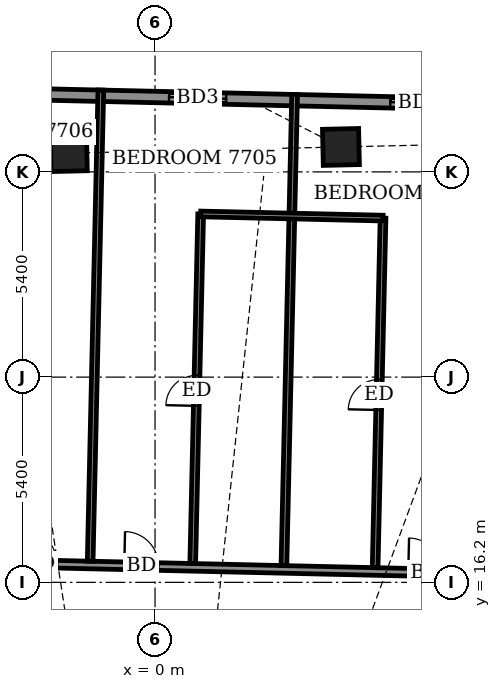
"""IFC4 building model, lengths in metres.
Left out: names, types, materials, properties, quantities, classifications, styles, units other than length and angle.
Written with IfcOpenShell. Run it as: python <this file> out.ifc"""

import sys

from ifc_helpers import new_model, si_unit, direction, frame, frame_2d, origin, origin_2d, place, context, subcontext, project, spatial, rectangle, extrude, element, fill, save


model = new_model("IFC4")
c1 = context("Model", 3, precision=1e-05, world=origin(), true_north=direction((0.0, 1.0)))
c2 = subcontext(c1, "Body", "Model", "MODEL_VIEW")
j1 = project(units=[si_unit("LENGTHUNIT", "METRE"), si_unit("PLANEANGLEUNIT", "RADIAN")], contexts=[c1])
p1 = place(None, origin())
s1 = spatial("IfcSite", under=j1, at=p1, CompositionType="ELEMENT")
p2 = place(p1, origin())
s2 = spatial("IfcBuilding", under=s1, at=p2, CompositionType="ELEMENT")
p3 = place(p2, frame((0.0, 0.0, 301.5)))
s3 = spatial("IfcBuildingStorey", under=s2, at=p3, CompositionType="ELEMENT", Elevation=301.5)
for number, where, z_axis, x_axis in (
    (1, (4.892, 27.656, -0.55), (0.0, 0.0, 1.0), (-1.0, -0.023, 0.0)),
    (2, (-2.268, 27.494, -0.55), (0.0, 0.0, 1.0), (-1.0, -0.023, 0.0)),
):
    element("IfcColumn", number, at=place(p3, frame(where, z_axis=z_axis, x_axis=x_axis)), inside=s3, PredefinedType="COLUMN", context=c2, shape_type="SweptSolid", body=[
        extrude(rectangle(XDim=0.95, YDim=0.95, at=origin_2d()), origin(), (0.0, 0.0, 1.0), 4.6),
    ])
p4 = place(p3, frame((25.264, 28.397, 0.0), z_axis=(0.0, 0.0, 1.0), x_axis=(-0.999742391375, 0.022696935658, 0.0)))
e3 = element("IfcWall", 3, at=p4, inside=s3, PredefinedType="SOLIDWALL", context=c2, shape_type="SweptSolid", body=[
    extrude(rectangle(XDim=51.9, YDim=0.3, at=frame_2d((25.95, 0.0))), origin(), (0.0, 0.0, 1.0), 2.15),
])
p5 = place(p4, frame((2.072, 0.0, 0.0)))
e4 = element("IfcOpeningElement", 4, at=p5, cuts=e3, PredefinedType="OPENING", context=c2, shape_type="SweptSolid", body=[
    extrude(rectangle(XDim=1.5, YDim=2.0, at=frame_2d((0.75, 1.0))), frame((0.0, 0.16, 0.0), z_axis=(0.0, -1.0, 0.0), x_axis=(1.0, 0.0, 0.0)), (0.0, 0.0, 1.0), 0.32),
])
p6 = place(p4, frame((9.699, 0.0, 0.5)))
e5 = element("IfcOpeningElement", 5, at=p6, cuts=e3, PredefinedType="OPENING", context=c2, shape_type="SweptSolid", body=[
    extrude(rectangle(XDim=1.2, YDim=1.1, at=frame_2d((0.6, 0.55))), frame((0.0, 0.16, 0.0), z_axis=(0.0, -1.0, 0.0), x_axis=(1.0, 0.0, 0.0)), (0.0, 0.0, 1.0), 0.32),
])
p7 = place(p4, frame((17.577, 0.0, 0.0)))
e6 = element("IfcOpeningElement", 6, at=p7, cuts=e3, PredefinedType="OPENING", context=c2, shape_type="SweptSolid", body=[
    extrude(rectangle(XDim=1.5, YDim=2.0, at=frame_2d((0.75, 1.0))), frame((0.0, 0.16, 0.0), z_axis=(0.0, -1.0, 0.0), x_axis=(1.0, 0.0, 0.0)), (0.0, 0.0, 1.0), 0.32),
])
p8 = place(p4, frame((23.4, 0.0, 0.0)))
e7 = element("IfcOpeningElement", 7, at=p8, cuts=e3, PredefinedType="OPENING", context=c2, shape_type="SweptSolid", body=[
    extrude(rectangle(XDim=1.5, YDim=2.0, at=frame_2d((0.75, 1.0))), frame((0.0, 0.16, 0.0), z_axis=(0.0, -1.0, 0.0), x_axis=(1.0, 0.0, 0.0)), (0.0, 0.0, 1.0), 0.32),
])
p9 = place(p4, frame((29.0, 0.0, 0.0)))
e8 = element("IfcOpeningElement", 8, at=p9, cuts=e3, PredefinedType="OPENING", context=c2, shape_type="SweptSolid", body=[
    extrude(rectangle(XDim=1.5, YDim=2.0, at=frame_2d((0.75, 1.0))), frame((0.0, 0.16, 0.0), z_axis=(0.0, -1.0, 0.0), x_axis=(1.0, 0.0, 0.0)), (0.0, 0.0, 1.0), 0.32),
])
p10 = place(p4, frame((34.25, 0.0, 0.5)))
e9 = element("IfcOpeningElement", 9, at=p10, cuts=e3, PredefinedType="OPENING", context=c2, shape_type="SweptSolid", body=[
    extrude(rectangle(XDim=1.2, YDim=1.1, at=frame_2d((0.6, 0.55))), frame((0.0, 0.16, 0.0), z_axis=(0.0, -1.0, 0.0), x_axis=(1.0, 0.0, 0.0)), (0.0, 0.0, 1.0), 0.32),
])
p11 = place(p4, frame((41.275, 0.0, 0.5)))
e10 = element("IfcOpeningElement", 10, at=p11, cuts=e3, PredefinedType="OPENING", context=c2, shape_type="SweptSolid", body=[
    extrude(rectangle(XDim=1.2, YDim=1.1, at=frame_2d((0.6, 0.55))), frame((0.0, 0.16, 0.0), z_axis=(0.0, -1.0, 0.0), x_axis=(1.0, 0.0, 0.0)), (0.0, 0.0, 1.0), 0.32),
])
p12 = place(p4, frame((48.325, 0.0, 0.5)))
e11 = element("IfcOpeningElement", 11, at=p12, cuts=e3, PredefinedType="OPENING", context=c2, shape_type="SweptSolid", body=[
    extrude(rectangle(XDim=1.2, YDim=1.1, at=frame_2d((0.6, 0.55))), frame((0.0, 0.16, 0.0), z_axis=(0.0, -1.0, 0.0), x_axis=(1.0, 0.0, 0.0)), (0.0, 0.0, 1.0), 0.32),
])
p13 = place(p3, frame((-26.362, 17.216, 0.0), z_axis=(0.0, 0.0, 1.0), x_axis=(0.999742445627, -0.022694545867, 0.0)))
e12 = element("IfcWall", 12, at=p13, inside=s3, PredefinedType="PARTITIONING", context=c2, shape_type="SweptSolid", body=[
    extrude(rectangle(XDim=54.509, YDim=0.2, at=frame_2d((27.255, 0.0))), origin(), (0.0, 0.0, 1.0), 2.1),
])
p14 = place(p13, frame((50.584, 0.0, 0.0)))
e13 = element("IfcOpeningElement", 13, at=p14, cuts=e12, PredefinedType="OPENING", context=c2, shape_type="SweptSolid", body=[
    extrude(rectangle(XDim=1.0, YDim=2.1, at=frame_2d((0.5, 1.05))), frame((0.0, 0.11, 0.0), z_axis=(0.0, -1.0, 0.0), x_axis=(1.0, 0.0, 0.0)), (0.0, 0.0, 1.0), 0.22),
])
p15 = place(p13, frame((44.509, 0.0, 0.0)))
e14 = element("IfcOpeningElement", 14, at=p15, cuts=e12, PredefinedType="OPENING", context=c2, shape_type="SweptSolid", body=[
    extrude(rectangle(XDim=0.9, YDim=2.1, at=frame_2d((0.45, 1.05))), frame((0.0, 0.11, 0.0), z_axis=(0.0, -1.0, 0.0), x_axis=(1.0, 0.0, 0.0)), (0.0, 0.0, 1.0), 0.22),
])
p16 = place(p13, frame((38.734, 0.0, 0.0)))
e15 = element("IfcOpeningElement", 15, at=p16, cuts=e12, PredefinedType="OPENING", context=c2, shape_type="SweptSolid", body=[
    extrude(rectangle(XDim=1.0, YDim=2.1, at=frame_2d((0.5, 1.05))), frame((0.0, 0.11, 0.0), z_axis=(0.0, -1.0, 0.0), x_axis=(1.0, 0.0, 0.0)), (0.0, 0.0, 1.0), 0.22),
])
p17 = place(p13, frame((33.034, 0.0, 0.0)))
e16 = element("IfcOpeningElement", 16, at=p17, cuts=e12, PredefinedType="OPENING", context=c2, shape_type="SweptSolid", body=[
    extrude(rectangle(XDim=0.9, YDim=2.1, at=frame_2d((0.45, 1.05))), frame((0.0, 0.11, 0.0), z_axis=(0.0, -1.0, 0.0), x_axis=(1.0, 0.0, 0.0)), (0.0, 0.0, 1.0), 0.22),
])
p18 = place(p13, frame((25.559, 0.0, 0.0)))
e17 = element("IfcOpeningElement", 17, at=p18, cuts=e12, PredefinedType="OPENING", context=c2, shape_type="SweptSolid", body=[
    extrude(rectangle(XDim=0.9, YDim=2.1, at=frame_2d((0.45, 1.05))), frame((0.0, 0.11, 0.0), z_axis=(0.0, -1.0, 0.0), x_axis=(1.0, 0.0, 0.0)), (0.0, 0.0, 1.0), 0.22),
])
p19 = place(p13, frame((22.884, 0.0, 0.0)))
e18 = element("IfcOpeningElement", 18, at=p19, cuts=e12, PredefinedType="OPENING", context=c2, shape_type="SweptSolid", body=[
    extrude(rectangle(XDim=0.9, YDim=2.1, at=frame_2d((0.45, 1.05))), frame((0.0, 0.11, 0.0), z_axis=(0.0, -1.0, 0.0), x_axis=(1.0, 0.0, 0.0)), (0.0, 0.0, 1.0), 0.22),
])
p20 = place(p13, frame((16.009, 0.0, 0.0)))
e19 = element("IfcOpeningElement", 19, at=p20, cuts=e12, PredefinedType="OPENING", context=c2, shape_type="SweptSolid", body=[
    extrude(rectangle(XDim=1.0, YDim=2.1, at=frame_2d((0.5, 1.05))), frame((0.0, 0.11, 0.0), z_axis=(0.0, -1.0, 0.0), x_axis=(1.0, 0.0, 0.0)), (0.0, 0.0, 1.0), 0.22),
])
p21 = place(p13, frame((10.184, 0.0, 0.0)))
e20 = element("IfcOpeningElement", 20, at=p21, cuts=e12, PredefinedType="OPENING", context=c2, shape_type="SweptSolid", body=[
    extrude(rectangle(XDim=1.0, YDim=2.1, at=frame_2d((0.5, 1.05))), frame((0.0, 0.11, 0.0), z_axis=(0.0, -1.0, 0.0), x_axis=(1.0, 0.0, 0.0)), (0.0, 0.0, 1.0), 0.22),
])
p22 = place(p13, frame((6.309, 0.0, 0.0)))
e21 = element("IfcOpeningElement", 21, at=p22, cuts=e12, PredefinedType="OPENING", context=c2, shape_type="SweptSolid", body=[
    extrude(rectangle(XDim=0.9, YDim=2.1, at=frame_2d((0.45, 1.05))), frame((0.0, 0.11, 0.0), z_axis=(0.0, -1.0, 0.0), x_axis=(1.0, 0.0, 0.0)), (0.0, 0.0, 1.0), 0.22),
])
p23 = place(p13, frame((0.2, 0.0, 0.0)))
e22 = element("IfcOpeningElement", 22, at=p23, cuts=e12, PredefinedType="OPENING", context=c2, shape_type="SweptSolid", body=[
    extrude(rectangle(XDim=1.0, YDim=2.1, at=frame_2d((0.5, 1.05))), frame((0.0, 0.11, 0.0), z_axis=(0.0, -1.0, 0.0), x_axis=(1.0, 0.0, 0.0)), (0.0, 0.0, 1.0), 0.22),
])
p24 = place(p13, frame((3.909, 0.0, 0.0)))
e23 = element("IfcOpeningElement", 23, at=p24, cuts=e12, PredefinedType="OPENING", context=c2, shape_type="SweptSolid", body=[
    extrude(rectangle(XDim=0.9, YDim=2.1, at=frame_2d((0.45, 1.05))), frame((0.0, 0.11, 0.0), z_axis=(0.0, -1.0, 0.0), x_axis=(1.0, 0.0, 0.0)), (0.0, 0.0, 1.0), 0.22),
])
p25 = place(p3, frame((-1.707, 16.756, 0.0), z_axis=(0.0, 0.0, 1.0), x_axis=(0.022661475803, 0.999743195783, 0.0)))
e24 = element("IfcWall", 24, at=p25, inside=s3, PredefinedType="PARTITIONING", context=c2, shape_type="SweptSolid", body=[
    extrude(rectangle(XDim=12.4, YDim=0.15, at=frame_2d((6.2, 0.0))), origin(), (0.0, 0.0, 1.0), 2.25),
])
p26 = place(p3, frame((0.992, 16.695, 0.0), z_axis=(0.0, 0.0, 1.0), x_axis=(0.02271477479, 0.999741986218, 0.0)))
e25 = element("IfcWall", 25, at=p26, inside=s3, PredefinedType="PARTITIONING", context=c2, shape_type="SweptSolid", body=[
    extrude(rectangle(XDim=9.2, YDim=0.15, at=frame_2d((4.6, 0.0))), origin(), (0.0, 0.0, 1.0), 4.05),
])
p27 = place(p26, frame((4.15, 0.0, 0.0)))
e26 = element("IfcOpeningElement", 26, at=p27, cuts=e25, PredefinedType="OPENING", context=c2, shape_type="SweptSolid", body=[
    extrude(rectangle(XDim=0.8, YDim=2.1, at=frame_2d((0.4, 1.05))), frame((0.0, 0.085, 0.0), z_axis=(0.0, -1.0, 0.0), x_axis=(1.0, 0.0, 0.0)), (0.0, 0.0, 1.0), 0.17),
])
p28 = place(p3, frame((3.391, 16.641, 0.0), z_axis=(0.0, 0.0, 1.0), x_axis=(0.022741979748, 0.999741367733, 0.0)))
e27 = element("IfcWall", 27, at=p28, inside=s3, PredefinedType="PARTITIONING", context=c2, shape_type="SweptSolid", body=[
    extrude(rectangle(XDim=12.399, YDim=0.15, at=frame_2d((6.2, 0.0))), origin(), (0.0, 0.0, 1.0), 2.25),
])
p29 = place(p3, frame((5.791, 16.586, 0.0), z_axis=(0.0, 0.0, 1.0), x_axis=(0.022608685365, 0.999744391005, 0.0)))
e28 = element("IfcWall", 28, at=p29, inside=s3, PredefinedType="PARTITIONING", context=c2, shape_type="SweptSolid", body=[
    extrude(rectangle(XDim=9.2, YDim=0.15, at=frame_2d((4.6, 0.0))), origin(), (0.0, 0.0, 1.0), 2.35),
])
p30 = place(p29, frame((4.15, 0.0, 0.0)))
e29 = element("IfcOpeningElement", 29, at=p30, cuts=e28, PredefinedType="OPENING", context=c2, shape_type="SweptSolid", body=[
    extrude(rectangle(XDim=0.8, YDim=2.1, at=frame_2d((0.4, 1.05))), frame((0.0, 0.085, 0.0), z_axis=(0.0, -1.0, 0.0), x_axis=(1.0, 0.0, 0.0)), (0.0, 0.0, 1.0), 0.17),
])
p31 = place(p3, frame((1.201, 25.893, 0.0), z_axis=(0.0, 0.0, 1.0), x_axis=(0.999741441463, -0.022738738327, 0.0)))
e30 = element("IfcWall", 30, at=p31, inside=s3, PredefinedType="PARTITIONING", context=c2, shape_type="SweptSolid", body=[
    extrude(rectangle(XDim=4.799, YDim=0.15, at=frame_2d((2.4, 0.0))), origin(), (0.0, 0.0, 1.0), 2.45),
])
p32 = place(p7, origin())
e31 = element("IfcDoor", 31, at=p32, inside=s3, OperationType="SLIDING_TO_LEFT", PredefinedType="DOOR", context=c2, shape_type="SweptSolid", body=[
    extrude(rectangle(XDim=1.5, YDim=2.0, at=frame_2d((0.75, 1.0))), frame((0.0, 0.025, 0.0), z_axis=(0.0, -1.0, 0.0), x_axis=(1.0, 0.0, 0.0)), (0.0, 0.0, 1.0), 0.05),
])
fill(e6, e31)
p33 = place(p8, origin())
e32 = element("IfcDoor", 32, at=p33, inside=s3, OperationType="SLIDING_TO_LEFT", PredefinedType="DOOR", context=c2, shape_type="SweptSolid", body=[
    extrude(rectangle(XDim=1.5, YDim=2.0, at=frame_2d((0.75, 1.0))), frame((0.0, 0.025, 0.0), z_axis=(0.0, -1.0, 0.0), x_axis=(1.0, 0.0, 0.0)), (0.0, 0.0, 1.0), 0.05),
])
fill(e7, e32)
p34 = place(p17, origin())
e33 = element("IfcDoor", 33, at=p34, inside=s3, OperationType="SINGLE_SWING_RIGHT", PredefinedType="DOOR", context=c2, shape_type="SweptSolid", body=[
    extrude(rectangle(XDim=0.9, YDim=2.1, at=frame_2d((0.45, 1.05))), frame((0.0, 0.025, 0.0), z_axis=(0.0, -1.0, 0.0), x_axis=(1.0, 0.0, 0.0)), (0.0, 0.0, 1.0), 0.05),
])
fill(e16, e33)
p35 = place(p30, origin())
e34 = element("IfcDoor", 34, at=p35, inside=s3, OperationType="SINGLE_SWING_RIGHT", PredefinedType="DOOR", context=c2, shape_type="SweptSolid", body=[
    extrude(rectangle(XDim=0.8, YDim=2.1, at=frame_2d((0.4, 1.05))), frame((0.0, 0.025, 0.0), z_axis=(0.0, -1.0, 0.0), x_axis=(1.0, 0.0, 0.0)), (0.0, 0.0, 1.0), 0.05),
])
fill(e29, e34)
p36 = place(p18, origin())
e35 = element("IfcDoor", 35, at=p36, inside=s3, OperationType="SINGLE_SWING_LEFT", PredefinedType="DOOR", context=c2, shape_type="SweptSolid", body=[
    extrude(rectangle(XDim=0.9, YDim=2.1, at=frame_2d((0.45, 1.05))), frame((0.0, 0.025, 0.0), z_axis=(0.0, -1.0, 0.0), x_axis=(1.0, 0.0, 0.0)), (0.0, 0.0, 1.0), 0.05),
])
fill(e17, e35)
p37 = place(p27, origin())
e36 = element("IfcDoor", 36, at=p37, inside=s3, OperationType="SINGLE_SWING_LEFT", PredefinedType="DOOR", context=c2, shape_type="SweptSolid", body=[
    extrude(rectangle(XDim=0.8, YDim=2.1, at=frame_2d((0.4, 1.05))), frame((0.0, 0.025, 0.0), z_axis=(0.0, -1.0, 0.0), x_axis=(1.0, 0.0, 0.0)), (0.0, 0.0, 1.0), 0.05),
])
fill(e26, e36)
p38 = place(p19, origin())
e37 = element("IfcDoor", 37, at=p38, inside=s3, OperationType="SINGLE_SWING_RIGHT", PredefinedType="DOOR", context=c2, shape_type="SweptSolid", body=[
    extrude(rectangle(XDim=0.9, YDim=2.1, at=frame_2d((0.45, 1.05))), frame((0.0, 0.025, 0.0), z_axis=(0.0, -1.0, 0.0), x_axis=(1.0, 0.0, 0.0)), (0.0, 0.0, 1.0), 0.05),
])
fill(e18, e37)
save(model, sys.argv[1])
